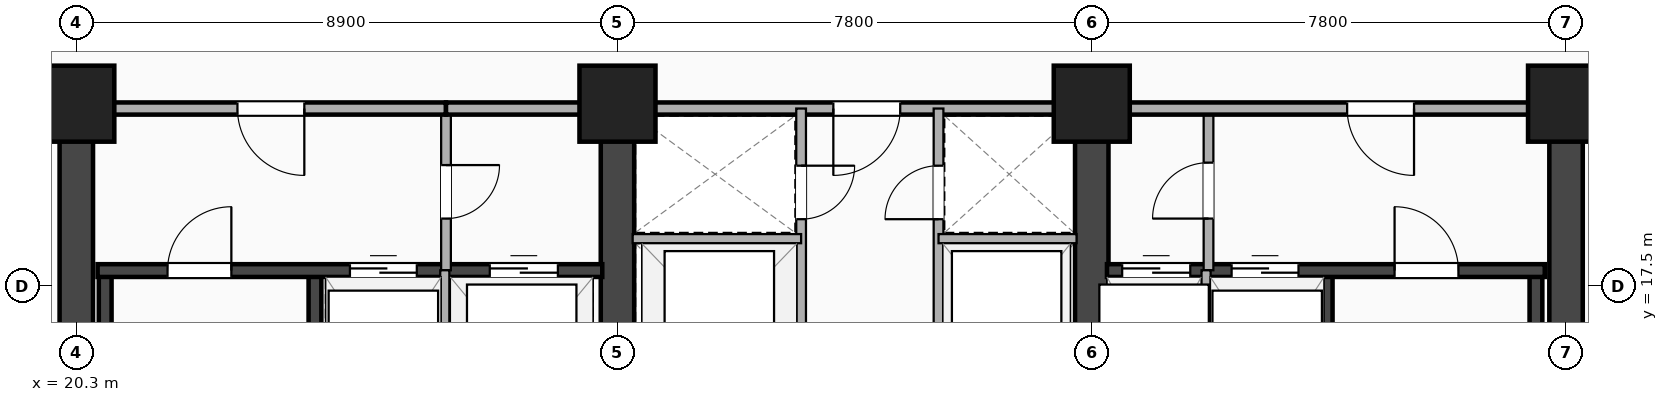
"""IFC4 building model, lengths in metres.
Left out: names, types, materials, properties, quantities, classifications, styles, units other than length and angle.
Written with IfcOpenShell. Run it as: python <this file> out.ifc"""

import sys

from ifc_helpers import new_model, si_unit, direction, frame, frame_2d, origin, origin_2d, place, context, subcontext, project, spatial, rectangle, extrude, element, fill, save


model = new_model("IFC4")
c1 = context("Model", 3, precision=1e-05, world=origin(), true_north=direction((0.0, 1.0)))
c2 = subcontext(c1, "Body", "Model", "MODEL_VIEW")
j1 = project(units=[si_unit("LENGTHUNIT", "METRE"), si_unit("PLANEANGLEUNIT", "RADIAN")], contexts=[c1])
p1 = place(None, origin())
s1 = spatial("IfcSite", under=j1, at=p1, CompositionType="ELEMENT")
p2 = place(p1, origin())
s2 = spatial("IfcBuilding", under=s1, at=p2, CompositionType="ELEMENT")
p3 = place(p2, frame((0.0, 0.0, 91.7)))
s3 = spatial("IfcBuildingStorey", under=s2, at=p3, CompositionType="ELEMENT", Elevation=91.7)
for number, where, z_axis, x_axis in (
    (1, (20.3, 3.5, 0.0), (0.0, 0.0, 1.0), (0.0, 1.0, 0.0)),
    (2, (44.8, 3.5, 0.0), (0.0, 0.0, 1.0), (0.0, 1.0, 0.0)),
):
    element("IfcWall", number, at=place(p3, frame(where, z_axis=z_axis, x_axis=x_axis)), inside=s3, PredefinedType="SHEAR", context=c2, shape_type="SweptSolid", body=[
        extrude(rectangle(XDim=16.9, YDim=0.55, at=frame_2d((8.45, 0.0))), origin(), (0.0, 0.0, 1.0), 3.24),
    ])
p4 = place(p3, frame((29.2, 3.5, 0.0), z_axis=(0.0, 0.0, 1.0), x_axis=(0.0, 1.0, 0.0)))
e3 = element("IfcWall", 3, at=p4, inside=s3, PredefinedType="SHEAR", context=c2, shape_type="SweptSolid", body=[
    extrude(rectangle(XDim=16.9, YDim=0.55, at=frame_2d((8.45, 0.0))), origin(), (0.0, 0.0, 1.0), 3.24),
])
p5 = place(p4, frame((7.75, 0.0, 0.0), z_axis=(0.0, 0.0, 1.0), x_axis=(-1.0, 0.0, 0.0)))
e4 = element("IfcOpeningElement", 4, at=p5, cuts=e3, PredefinedType="OPENING", context=c2, shape_type="SweptSolid", body=[
    extrude(rectangle(XDim=1.1, YDim=2.15, at=frame_2d((0.55, 1.075))), frame((0.0, 0.285, 0.0), z_axis=(0.0, -1.0, 0.0), x_axis=(1.0, 0.0, 0.0)), (0.0, 0.0, 1.0), 0.57),
])
p6 = place(p3, frame((37.0, 3.5, 0.0), z_axis=(0.0, 0.0, 1.0), x_axis=(0.0, 1.0, 0.0)))
e5 = element("IfcWall", 5, at=p6, inside=s3, PredefinedType="SHEAR", context=c2, shape_type="SweptSolid", body=[
    extrude(rectangle(XDim=16.9, YDim=0.55, at=frame_2d((8.45, 0.0))), origin(), (0.0, 0.0, 1.0), 3.24),
])
p7 = place(p6, frame((6.65, 0.0, 0.0)))
e6 = element("IfcOpeningElement", 6, at=p7, cuts=e5, PredefinedType="OPENING", context=c2, shape_type="SweptSolid", body=[
    extrude(rectangle(XDim=1.1, YDim=2.15, at=frame_2d((0.55, 1.075))), frame((0.0, 0.285, 0.0), z_axis=(0.0, -1.0, 0.0), x_axis=(1.0, 0.0, 0.0)), (0.0, 0.0, 1.0), 0.57),
])
for number, where, z_axis, x_axis in (
    (7, (20.775, 9.745, 0.0), (0.0, 0.0, 1.0), (0.0, 1.0, 0.0)),
    (8, (24.225, 9.745, 0.0), (0.0, 0.0, 1.0), (0.0, 1.0, 0.0)),
):
    element("IfcWall", number, at=place(p3, frame(where, z_axis=z_axis, x_axis=x_axis)), inside=s3, PredefinedType="SHEAR", context=c2, shape_type="SweptSolid", body=[
        extrude(rectangle(XDim=8.01, YDim=0.21, at=frame_2d((4.005, 0.0))), origin(), (0.0, 0.0, 1.0), 3.24),
    ])
p8 = place(p3, frame((20.65, 17.755, 0.0), z_axis=(0.0, 0.0, 1.0), x_axis=(1.0, 0.0, 0.0)))
e9 = element("IfcWall", 9, at=p8, inside=s3, PredefinedType="SHEAR", context=c2, shape_type="SweptSolid", body=[
    extrude(rectangle(XDim=8.3, YDim=0.21, at=frame_2d((4.15, 0.0))), origin(), (0.0, 0.0, 1.0), 3.24),
])
p9 = place(p8, frame((2.2, 0.0, 0.0), z_axis=(0.0, 0.0, 1.0), x_axis=(-1.0, 0.0, 0.0)))
e10 = element("IfcOpeningElement", 10, at=p9, cuts=e9, PredefinedType="OPENING", context=c2, shape_type="SweptSolid", body=[
    extrude(rectangle(XDim=1.05, YDim=2.15, at=frame_2d((0.525, 1.075))), frame((0.0, 0.115, 0.0), z_axis=(0.0, -1.0, 0.0), x_axis=(1.0, 0.0, 0.0)), (0.0, 0.0, 1.0), 0.23),
])
p10 = place(p8, frame((4.15, 0.0, 0.0)))
e11 = element("IfcOpeningElement", 11, at=p10, cuts=e9, PredefinedType="OPENING", context=c2, shape_type="SweptSolid", body=[
    extrude(rectangle(XDim=1.1, YDim=2.18, at=frame_2d((0.55, 1.09))), frame((0.0, 0.115, 0.0), z_axis=(0.0, -1.0, 0.0), x_axis=(1.0, 0.0, 0.0)), (0.0, 0.0, 1.0), 0.23),
])
p11 = place(p8, frame((6.45, 0.0, 0.0)))
e12 = element("IfcOpeningElement", 12, at=p11, cuts=e9, PredefinedType="OPENING", context=c2, shape_type="SweptSolid", body=[
    extrude(rectangle(XDim=1.12, YDim=2.2, at=frame_2d((0.56, 1.1))), frame((0.0, 0.115, 0.0), z_axis=(0.0, -1.0, 0.0), x_axis=(1.0, 0.0, 0.0)), (0.0, 0.0, 1.0), 0.23),
])
for number, where, z_axis, x_axis in (
    (13, (40.855, 9.745, 0.0), (0.0, 0.0, 1.0), (0.0, 1.0, 0.0)),
    (14, (44.305, 9.745, 0.0), (0.0, 0.0, 1.0), (0.0, 1.0, 0.0)),
):
    element("IfcWall", number, at=place(p3, frame(where, z_axis=z_axis, x_axis=x_axis)), inside=s3, PredefinedType="SHEAR", context=c2, shape_type="SweptSolid", body=[
        extrude(rectangle(XDim=8.01, YDim=0.21, at=frame_2d((4.005, 0.0))), origin(), (0.0, 0.0, 1.0), 3.24),
    ])
p12 = place(p3, frame((37.25, 17.755, 0.0), z_axis=(0.0, 0.0, 1.0), x_axis=(1.0, 0.0, 0.0)))
e15 = element("IfcWall", 15, at=p12, inside=s3, PredefinedType="SHEAR", context=c2, shape_type="SweptSolid", body=[
    extrude(rectangle(XDim=7.2, YDim=0.21, at=frame_2d((3.6, 0.0))), origin(), (0.0, 0.0, 1.0), 3.24),
])
p13 = place(p12, frame((0.25, 0.0, 0.0)))
e16 = element("IfcOpeningElement", 16, at=p13, cuts=e15, PredefinedType="OPENING", context=c2, shape_type="SweptSolid", body=[
    extrude(rectangle(XDim=1.12, YDim=2.2, at=frame_2d((0.56, 1.1))), frame((0.0, 0.115, 0.0), z_axis=(0.0, -1.0, 0.0), x_axis=(1.0, 0.0, 0.0)), (0.0, 0.0, 1.0), 0.23),
])
p14 = place(p12, frame((2.05, 0.0, 0.0)))
e17 = element("IfcOpeningElement", 17, at=p14, cuts=e15, PredefinedType="OPENING", context=c2, shape_type="SweptSolid", body=[
    extrude(rectangle(XDim=1.1, YDim=2.18, at=frame_2d((0.55, 1.09))), frame((0.0, 0.115, 0.0), z_axis=(0.0, -1.0, 0.0), x_axis=(1.0, 0.0, 0.0)), (0.0, 0.0, 1.0), 0.23),
])
p15 = place(p12, frame((5.78, 0.0, 0.0), z_axis=(0.0, 0.0, 1.0), x_axis=(-1.0, 0.0, 0.0)))
e18 = element("IfcOpeningElement", 18, at=p15, cuts=e15, PredefinedType="OPENING", context=c2, shape_type="SweptSolid", body=[
    extrude(rectangle(XDim=1.05, YDim=2.15, at=frame_2d((0.525, 1.075))), frame((0.0, 0.115, 0.0), z_axis=(0.0, -1.0, 0.0), x_axis=(1.0, 0.0, 0.0)), (0.0, 0.0, 1.0), 0.23),
])
for number, where, z_axis, x_axis in (
    (19, (20.3, 20.5, -0.26), (0.0, 0.0, 1.0), (1.0, 0.0, 0.0)),
    (20, (29.2, 20.5, -0.26), (0.0, 0.0, 1.0), (1.0, 0.0, 0.0)),
    (21, (37.0, 20.5, -0.26), (0.0, 0.0, 1.0), (1.0, 0.0, 0.0)),
    (22, (44.8, 20.5, -0.26), (0.0, 0.0, 1.0), (1.0, 0.0, 0.0)),
):
    element("IfcColumn", number, at=place(p3, frame(where, z_axis=z_axis, x_axis=x_axis)), inside=s3, PredefinedType="COLUMN", context=c2, shape_type="SweptSolid", body=[
        extrude(rectangle(XDim=1.25, YDim=1.25, at=origin_2d()), origin(), (0.0, 0.0, 1.0), 3.5),
    ])
p16 = place(p3, frame((26.38, 17.76, 0.0), z_axis=(0.0, 0.0, 1.0), x_axis=(0.0, 1.0, 0.0)))
e23 = element("IfcWall", 23, at=p16, inside=s3, PredefinedType="PARTITIONING", context=c2, shape_type="SweptSolid", body=[
    extrude(rectangle(XDim=2.66, YDim=0.16, at=frame_2d((1.33, 0.0))), origin(), (0.0, 0.0, 1.0), 2.614),
])
p17 = place(p16, frame((0.85, 0.0, 0.0)))
e24 = element("IfcOpeningElement", 24, at=p17, cuts=e23, PredefinedType="OPENING", context=c2, shape_type="SweptSolid", body=[
    extrude(rectangle(XDim=0.88, YDim=2.08, at=frame_2d((0.44, 1.04))), frame((0.0, 0.09, 0.0), z_axis=(0.0, -1.0, 0.0), x_axis=(1.0, 0.0, 0.0)), (0.0, 0.0, 1.0), 0.18),
])
p18 = place(p3, frame((38.92, 17.76, 0.0), z_axis=(0.0, 0.0, 1.0), x_axis=(0.0, 1.0, 0.0)))
e25 = element("IfcWall", 25, at=p18, inside=s3, PredefinedType="PARTITIONING", context=c2, shape_type="SweptSolid", body=[
    extrude(rectangle(XDim=2.66, YDim=0.16, at=frame_2d((1.33, 0.0))), origin(), (0.0, 0.0, 1.0), 2.614),
])
p19 = place(p18, frame((1.77, 0.0, 0.0), z_axis=(0.0, 0.0, 1.0), x_axis=(-1.0, 0.0, 0.0)))
e26 = element("IfcOpeningElement", 26, at=p19, cuts=e25, PredefinedType="OPENING", context=c2, shape_type="SweptSolid", body=[
    extrude(rectangle(XDim=0.92, YDim=2.08, at=frame_2d((0.46, 1.04))), frame((0.0, 0.09, 0.0), z_axis=(0.0, -1.0, 0.0), x_axis=(1.0, 0.0, 0.0)), (0.0, 0.0, 1.0), 0.18),
])
for number, where, z_axis, x_axis in (
    (27, (26.36, 14.72, 0.0), (0.0, 0.0, 1.0), (0.0, 1.0, 0.0)),
    (28, (38.88, 14.72, 0.0), (0.0, 0.0, 1.0), (0.0, 1.0, 0.0)),
):
    element("IfcWall", number, at=place(p3, frame(where, z_axis=z_axis, x_axis=x_axis)), inside=s3, PredefinedType="PARTITIONING", context=c2, shape_type="SweptSolid", body=[
        extrude(rectangle(XDim=3.04, YDim=0.15, at=frame_2d((1.52, 0.0))), origin(), (0.0, 0.0, 1.0), 3.24),
    ])
p20 = place(p3, frame((20.65, 20.42, 0.0), z_axis=(0.0, 0.0, 1.0), x_axis=(1.0, 0.0, 0.0)))
e29 = element("IfcWall", 29, at=p20, inside=s3, PredefinedType="PARTITIONING", context=c2, shape_type="SweptSolid", body=[
    extrude(rectangle(XDim=5.73, YDim=0.2, at=frame_2d((2.865, 0.0))), origin(), (0.0, 0.0, 1.0), 2.313),
])
p21 = place(p20, frame((2.3, 0.0, 0.0)))
e30 = element("IfcOpeningElement", 30, at=p21, cuts=e29, PredefinedType="OPENING", context=c2, shape_type="SweptSolid", body=[
    extrude(rectangle(XDim=1.1, YDim=2.15, at=frame_2d((0.55, 1.075))), frame((0.0, 0.11, 0.0), z_axis=(0.0, -1.0, 0.0), x_axis=(1.0, 0.0, 0.0)), (0.0, 0.0, 1.0), 0.22),
])
p22 = place(p3, frame((26.38, 20.42, 0.0), z_axis=(0.0, 0.0, 1.0), x_axis=(1.0, 0.0, 0.0)))
e31 = element("IfcWall", 31, at=p22, inside=s3, PredefinedType="PARTITIONING", context=c2, shape_type="SweptSolid", body=[
    extrude(rectangle(XDim=2.82, YDim=0.2, at=frame_2d((1.41, 0.0))), origin(), (0.0, 0.0, 1.0), 2.313),
])
p23 = place(p3, frame((29.2, 20.42, 0.0), z_axis=(0.0, 0.0, 1.0), x_axis=(1.0, 0.0, 0.0)))
e32 = element("IfcWall", 32, at=p23, inside=s3, PredefinedType="PARTITIONING", context=c2, shape_type="SweptSolid", body=[
    extrude(rectangle(XDim=7.8, YDim=0.2, at=frame_2d((3.9, 0.0))), origin(), (0.0, 0.0, 1.0), 2.313),
])
p24 = place(p23, frame((3.55, 0.0, 0.0)))
e33 = element("IfcOpeningElement", 33, at=p24, cuts=e32, PredefinedType="OPENING", context=c2, shape_type="SweptSolid", body=[
    extrude(rectangle(XDim=1.1, YDim=2.15, at=frame_2d((0.55, 1.075))), frame((0.0, 0.11, 0.0), z_axis=(0.0, -1.0, 0.0), x_axis=(1.0, 0.0, 0.0)), (0.0, 0.0, 1.0), 0.22),
])
p25 = place(p3, frame((37.0, 20.42, 0.0), z_axis=(0.0, 0.0, 1.0), x_axis=(1.0, 0.0, 0.0)))
e34 = element("IfcWall", 34, at=p25, inside=s3, PredefinedType="PARTITIONING", context=c2, shape_type="SweptSolid", body=[
    extrude(rectangle(XDim=7.45, YDim=0.2, at=frame_2d((3.725, 0.0))), origin(), (0.0, 0.0, 1.0), 2.313),
])
p26 = place(p25, frame((4.2, 0.0, 0.0)))
e35 = element("IfcOpeningElement", 35, at=p26, cuts=e34, PredefinedType="OPENING", context=c2, shape_type="SweptSolid", body=[
    extrude(rectangle(XDim=1.1, YDim=2.15, at=frame_2d((0.55, 1.075))), frame((0.0, 0.11, 0.0), z_axis=(0.0, -1.0, 0.0), x_axis=(1.0, 0.0, 0.0)), (0.0, 0.0, 1.0), 0.22),
])
p27 = place(p3, frame((32.22, 12.5, 0.0), z_axis=(0.0, 0.0, 1.0), x_axis=(0.0, 1.0, 0.0)))
e36 = element("IfcWall", 36, at=p27, inside=s3, PredefinedType="PARTITIONING", context=c2, shape_type="SweptSolid", body=[
    extrude(rectangle(XDim=7.92, YDim=0.16, at=frame_2d((3.96, 0.0))), origin(), (0.0, 0.0, 1.0), 2.614),
])
p28 = place(p27, frame((1.43, 0.0, 0.0), z_axis=(0.0, 0.0, 1.0), x_axis=(-1.0, 0.0, 0.0)))
e37 = element("IfcOpeningElement", 37, at=p28, cuts=e36, PredefinedType="OPENING", context=c2, shape_type="SweptSolid", body=[
    extrude(rectangle(XDim=1.08, YDim=2.16, at=frame_2d((0.54, 1.08))), frame((0.0, 0.09, 0.0), z_axis=(0.0, -1.0, 0.0), x_axis=(1.0, 0.0, 0.0)), (0.0, 0.0, 1.0), 0.18),
])
p29 = place(p27, frame((4.33, 0.0, 0.0), z_axis=(0.0, 0.0, 1.0), x_axis=(-1.0, 0.0, 0.0)))
e38 = element("IfcOpeningElement", 38, at=p29, cuts=e36, PredefinedType="OPENING", context=c2, shape_type="SweptSolid", body=[
    extrude(rectangle(XDim=1.08, YDim=2.16, at=frame_2d((0.54, 1.08))), frame((0.0, 0.09, 0.0), z_axis=(0.0, -1.0, 0.0), x_axis=(1.0, 0.0, 0.0)), (0.0, 0.0, 1.0), 0.18),
])
p30 = place(p27, frame((6.1, 0.0, 0.0)))
e39 = element("IfcOpeningElement", 39, at=p30, cuts=e36, PredefinedType="OPENING", context=c2, shape_type="SweptSolid", body=[
    extrude(rectangle(XDim=0.88, YDim=2.08, at=frame_2d((0.44, 1.04))), frame((0.0, 0.09, 0.0), z_axis=(0.0, -1.0, 0.0), x_axis=(1.0, 0.0, 0.0)), (0.0, 0.0, 1.0), 0.18),
])
p31 = place(p3, frame((34.48, 12.5, 0.0), z_axis=(0.0, 0.0, 1.0), x_axis=(0.0, 1.0, 0.0)))
e40 = element("IfcWall", 40, at=p31, inside=s3, PredefinedType="PARTITIONING", context=c2, shape_type="SweptSolid", body=[
    extrude(rectangle(XDim=7.92, YDim=0.16, at=frame_2d((3.96, 0.0))), origin(), (0.0, 0.0, 1.0), 2.614),
])
p32 = place(p31, frame((0.35, 0.0, 0.0)))
e41 = element("IfcOpeningElement", 41, at=p32, cuts=e40, PredefinedType="OPENING", context=c2, shape_type="SweptSolid", body=[
    extrude(rectangle(XDim=1.08, YDim=2.16, at=frame_2d((0.54, 1.08))), frame((0.0, 0.09, 0.0), z_axis=(0.0, -1.0, 0.0), x_axis=(1.0, 0.0, 0.0)), (0.0, 0.0, 1.0), 0.18),
])
p33 = place(p31, frame((3.25, 0.0, 0.0)))
e42 = element("IfcOpeningElement", 42, at=p33, cuts=e40, PredefinedType="OPENING", context=c2, shape_type="SweptSolid", body=[
    extrude(rectangle(XDim=1.08, YDim=2.16, at=frame_2d((0.54, 1.08))), frame((0.0, 0.09, 0.0), z_axis=(0.0, -1.0, 0.0), x_axis=(1.0, 0.0, 0.0)), (0.0, 0.0, 1.0), 0.18),
])
p34 = place(p31, frame((6.98, 0.0, 0.0), z_axis=(0.0, 0.0, 1.0), x_axis=(-1.0, 0.0, 0.0)))
e43 = element("IfcOpeningElement", 43, at=p34, cuts=e40, PredefinedType="OPENING", context=c2, shape_type="SweptSolid", body=[
    extrude(rectangle(XDim=0.88, YDim=2.08, at=frame_2d((0.44, 1.04))), frame((0.0, 0.09, 0.0), z_axis=(0.0, -1.0, 0.0), x_axis=(1.0, 0.0, 0.0)), (0.0, 0.0, 1.0), 0.18),
])
p35 = place(p3, frame((29.45, 18.28, 0.0), z_axis=(0.0, 0.0, 1.0), x_axis=(1.0, 0.0, 0.0)))
e44 = element("IfcWall", 44, at=p35, inside=s3, PredefinedType="PARTITIONING", context=c2, shape_type="SweptSolid", body=[
    extrude(rectangle(XDim=2.77, YDim=0.15, at=frame_2d((1.385, 0.0))), origin(), (0.0, 0.0, 1.0), 3.24),
])
p36 = place(p3, frame((34.48, 18.28, 0.0), z_axis=(0.0, 0.0, 1.0), x_axis=(1.0, 0.0, 0.0)))
e45 = element("IfcWall", 45, at=p36, inside=s3, PredefinedType="PARTITIONING", context=c2, shape_type="SweptSolid", body=[
    extrude(rectangle(XDim=2.27, YDim=0.15, at=frame_2d((1.135, 0.0))), origin(), (0.0, 0.0, 1.0), 3.24),
])
p37 = place(p3, frame((18.65, 20.42, 0.0), z_axis=(0.0, 0.0, 1.0), x_axis=(1.0, 0.0, 0.0)))
e46 = element("IfcWall", 46, at=p37, inside=s3, PredefinedType="PARTITIONING", context=c2, shape_type="SweptSolid", body=[
    extrude(rectangle(XDim=1.65, YDim=0.16, at=frame_2d((0.825, 0.0))), origin(), (0.0, 0.0, 1.0), 2.313),
])
p38 = place(p3, frame((44.8, 20.42, 0.0), z_axis=(0.0, 0.0, 1.0), x_axis=(1.0, 0.0, 0.0)))
e47 = element("IfcWall", 47, at=p38, inside=s3, PredefinedType="PARTITIONING", context=c2, shape_type="SweptSolid", body=[
    extrude(rectangle(XDim=1.65, YDim=0.16, at=frame_2d((0.825, 0.0))), origin(), (0.0, 0.0, 1.0), 2.313),
])
p39 = place(p9, origin())
e48 = element("IfcDoor", 48, at=p39, inside=s3, OperationType="SINGLE_SWING_RIGHT", PredefinedType="DOOR", context=c2, shape_type="SweptSolid", body=[
    extrude(rectangle(XDim=1.05, YDim=2.15, at=frame_2d((0.525, 1.075))), frame((0.0, 0.025, 0.0), z_axis=(0.0, -1.0, 0.0), x_axis=(1.0, 0.0, 0.0)), (0.0, 0.0, 1.0), 0.05),
])
fill(e10, e48)
p40 = place(p10, origin())
e49 = element("IfcDoor", 49, at=p40, inside=s3, OperationType="DOUBLE_DOOR_SLIDING", PredefinedType="DOOR", context=c2, shape_type="SweptSolid", body=[
    extrude(rectangle(XDim=1.1, YDim=2.18, at=frame_2d((0.55, 1.09))), frame((0.0, 0.025, 0.0), z_axis=(0.0, -1.0, 0.0), x_axis=(1.0, 0.0, 0.0)), (0.0, 0.0, 1.0), 0.05),
])
fill(e11, e49)
p41 = place(p11, origin())
e50 = element("IfcDoor", 50, at=p41, inside=s3, OperationType="DOUBLE_DOOR_SLIDING", PredefinedType="DOOR", context=c2, shape_type="SweptSolid", body=[
    extrude(rectangle(XDim=1.12, YDim=2.2, at=frame_2d((0.56, 1.1))), frame((0.0, 0.025, 0.0), z_axis=(0.0, -1.0, 0.0), x_axis=(1.0, 0.0, 0.0)), (0.0, 0.0, 1.0), 0.05),
])
fill(e12, e50)
p42 = place(p13, origin())
e51 = element("IfcDoor", 51, at=p42, inside=s3, OperationType="DOUBLE_DOOR_SLIDING", PredefinedType="DOOR", context=c2, shape_type="SweptSolid", body=[
    extrude(rectangle(XDim=1.12, YDim=2.2, at=frame_2d((0.56, 1.1))), frame((0.0, 0.025, 0.0), z_axis=(0.0, -1.0, 0.0), x_axis=(1.0, 0.0, 0.0)), (0.0, 0.0, 1.0), 0.05),
])
fill(e16, e51)
p43 = place(p14, origin())
e52 = element("IfcDoor", 52, at=p43, inside=s3, OperationType="DOUBLE_DOOR_SLIDING", PredefinedType="DOOR", context=c2, shape_type="SweptSolid", body=[
    extrude(rectangle(XDim=1.1, YDim=2.18, at=frame_2d((0.55, 1.09))), frame((0.0, 0.025, 0.0), z_axis=(0.0, -1.0, 0.0), x_axis=(1.0, 0.0, 0.0)), (0.0, 0.0, 1.0), 0.05),
])
fill(e17, e52)
p44 = place(p15, origin())
e53 = element("IfcDoor", 53, at=p44, inside=s3, OperationType="SINGLE_SWING_LEFT", PredefinedType="DOOR", context=c2, shape_type="SweptSolid", body=[
    extrude(rectangle(XDim=1.05, YDim=2.15, at=frame_2d((0.525, 1.075))), frame((0.0, 0.025, 0.0), z_axis=(0.0, -1.0, 0.0), x_axis=(1.0, 0.0, 0.0)), (0.0, 0.0, 1.0), 0.05),
])
fill(e18, e53)
p45 = place(p17, origin())
e54 = element("IfcDoor", 54, at=p45, inside=s3, OperationType="SINGLE_SWING_RIGHT", PredefinedType="DOOR", context=c2, shape_type="SweptSolid", body=[
    extrude(rectangle(XDim=0.88, YDim=2.08, at=frame_2d((0.44, 1.04))), frame((0.0, 0.025, 0.0), z_axis=(0.0, -1.0, 0.0), x_axis=(1.0, 0.0, 0.0)), (0.0, 0.0, 1.0), 0.05),
])
fill(e24, e54)
p46 = place(p19, origin())
e55 = element("IfcDoor", 55, at=p46, inside=s3, OperationType="SINGLE_SWING_LEFT", PredefinedType="DOOR", context=c2, shape_type="SweptSolid", body=[
    extrude(rectangle(XDim=0.92, YDim=2.08, at=frame_2d((0.46, 1.04))), frame((0.0, 0.025, 0.0), z_axis=(0.0, -1.0, 0.0), x_axis=(1.0, 0.0, 0.0)), (0.0, 0.0, 1.0), 0.05),
])
fill(e26, e55)
p47 = place(p21, origin())
e56 = element("IfcDoor", 56, at=p47, inside=s3, OperationType="SINGLE_SWING_RIGHT", PredefinedType="DOOR", context=c2, shape_type="SweptSolid", body=[
    extrude(rectangle(XDim=1.1, YDim=2.15, at=frame_2d((0.55, 1.075))), frame((0.0, 0.025, 0.0), z_axis=(0.0, -1.0, 0.0), x_axis=(1.0, 0.0, 0.0)), (0.0, 0.0, 1.0), 0.05),
])
fill(e30, e56)
p48 = place(p24, origin())
e57 = element("IfcDoor", 57, at=p48, inside=s3, OperationType="SINGLE_SWING_LEFT", PredefinedType="DOOR", context=c2, shape_type="SweptSolid", body=[
    extrude(rectangle(XDim=1.1, YDim=2.15, at=frame_2d((0.55, 1.075))), frame((0.0, 0.025, 0.0), z_axis=(0.0, -1.0, 0.0), x_axis=(1.0, 0.0, 0.0)), (0.0, 0.0, 1.0), 0.05),
])
fill(e33, e57)
p49 = place(p26, origin())
e58 = element("IfcDoor", 58, at=p49, inside=s3, OperationType="SINGLE_SWING_RIGHT", PredefinedType="DOOR", context=c2, shape_type="SweptSolid", body=[
    extrude(rectangle(XDim=1.1, YDim=2.15, at=frame_2d((0.55, 1.075))), frame((0.0, 0.025, 0.0), z_axis=(0.0, -1.0, 0.0), x_axis=(1.0, 0.0, 0.0)), (0.0, 0.0, 1.0), 0.05),
])
fill(e35, e58)
p50 = place(p30, origin())
e59 = element("IfcDoor", 59, at=p50, inside=s3, OperationType="SINGLE_SWING_RIGHT", PredefinedType="DOOR", context=c2, shape_type="SweptSolid", body=[
    extrude(rectangle(XDim=0.88, YDim=2.08, at=frame_2d((0.44, 1.04))), frame((0.0, 0.025, 0.0), z_axis=(0.0, -1.0, 0.0), x_axis=(1.0, 0.0, 0.0)), (0.0, 0.0, 1.0), 0.05),
])
fill(e39, e59)
p51 = place(p34, origin())
e60 = element("IfcDoor", 60, at=p51, inside=s3, OperationType="SINGLE_SWING_LEFT", PredefinedType="DOOR", context=c2, shape_type="SweptSolid", body=[
    extrude(rectangle(XDim=0.88, YDim=2.08, at=frame_2d((0.44, 1.04))), frame((0.0, 0.025, 0.0), z_axis=(0.0, -1.0, 0.0), x_axis=(1.0, 0.0, 0.0)), (0.0, 0.0, 1.0), 0.05),
])
fill(e43, e60)
save(model, sys.argv[1])
